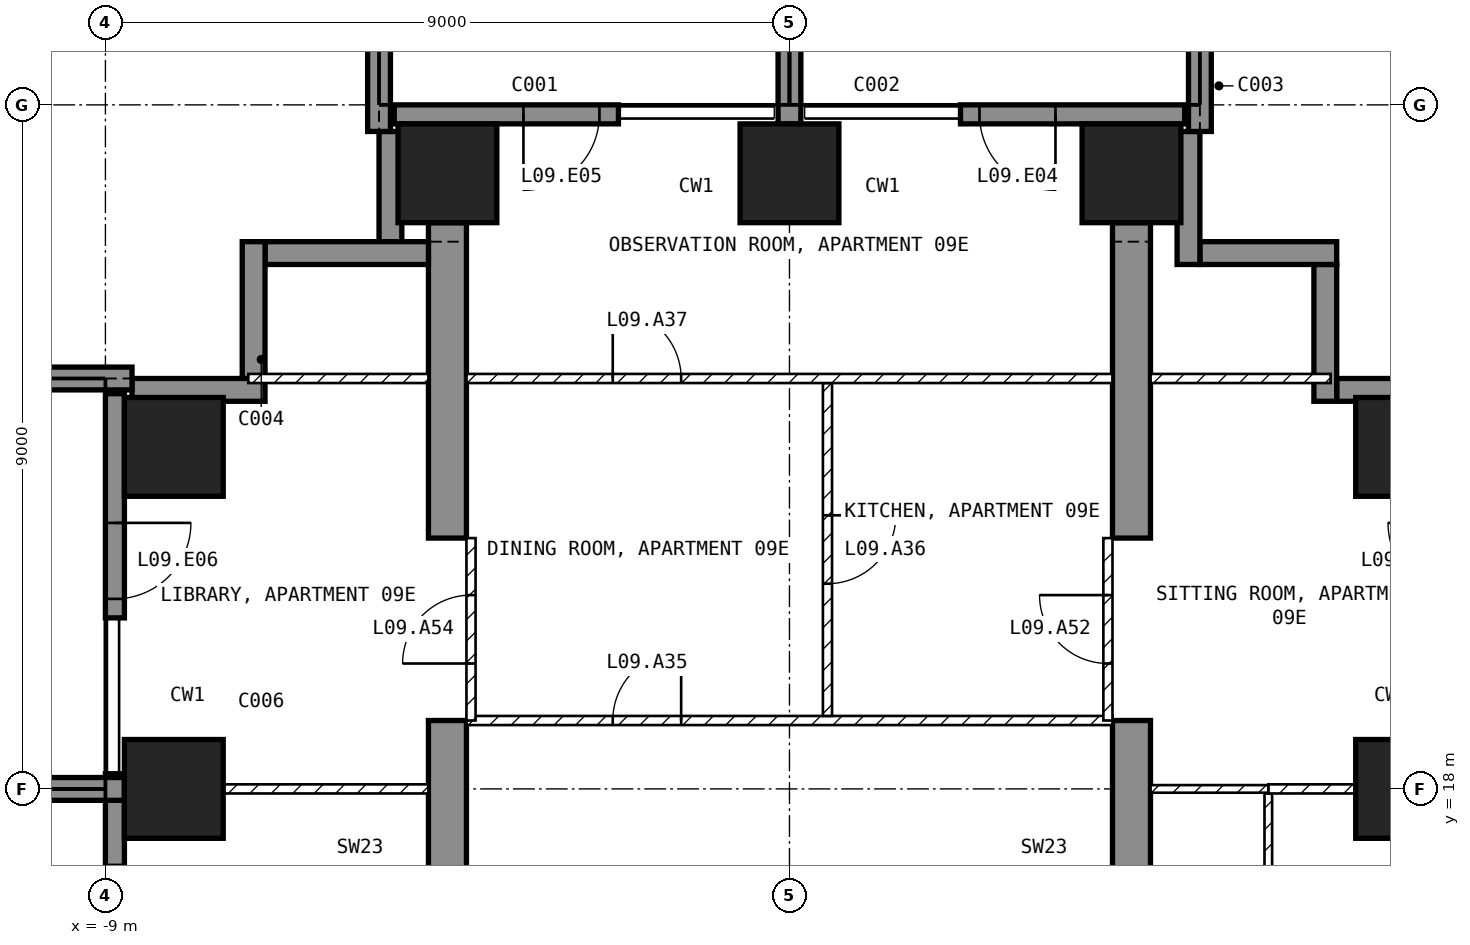
"""IFC4 building model, lengths in metres.
Left out: names, types, materials, properties, quantities, classifications, styles, units other than length and angle.
Written with IfcOpenShell. Run it as: python <this file> out.ifc"""

import sys

from ifc_helpers import new_model, si_unit, direction, frame, frame_2d, origin, origin_2d, place, context, subcontext, project, spatial, polyline, rectangle, outline, extrude, element, fill, save


model = new_model("IFC4")
c1 = context("Model", 3, precision=1e-05, world=origin(), true_north=direction((0.0, 1.0)))
c2 = subcontext(c1, "Body", "Model", "MODEL_VIEW")
j1 = project(units=[si_unit("LENGTHUNIT", "METRE"), si_unit("PLANEANGLEUNIT", "RADIAN")], contexts=[c1])
p1 = place(None, origin())
s1 = spatial("IfcSite", under=j1, at=p1, CompositionType="ELEMENT")
p2 = place(p1, origin())
s2 = spatial("IfcBuilding", under=s1, at=p2, CompositionType="ELEMENT")
p3 = place(p2, frame((0.0, 0.0, 50.5)))
s3 = spatial("IfcBuildingStorey", under=s2, at=p3, CompositionType="ELEMENT", Elevation=50.5)
for number, where, z_axis, x_axis in (
    (1, (-8.1, 18.0, -0.25), (0.0, 0.0, 1.0), (1.0, 0.0, 0.0)),
    (2, (-8.1, 22.5, -0.25), (0.0, 0.0, 1.0), (1.0, 0.0, 0.0)),
    (3, (-4.5, 26.1, -0.25), (0.0, 0.0, 1.0), (1.0, 0.0, 0.0)),
    (4, (0.0, 26.1, -0.25), (0.0, 0.0, 1.0), (1.0, 0.0, 0.0)),
    (5, (4.5, 26.1, -0.25), (0.0, 0.0, 1.0), (1.0, 0.0, 0.0)),
    (6, (8.1, 18.0, -0.25), (0.0, 0.0, 1.0), (1.0, 0.0, 0.0)),
    (7, (8.1, 22.5, -0.25), (0.0, 0.0, 1.0), (1.0, 0.0, 0.0)),
):
    element("IfcColumn", number, at=place(p3, frame(where, z_axis=z_axis, x_axis=x_axis)), inside=s3, PredefinedType="COLUMN", context=c2, shape_type="SweptSolid", body=[
        extrude(rectangle(XDim=1.3, YDim=1.3, at=origin_2d()), origin(), (0.0, 0.0, 1.0), 3.5),
    ])
for number, where, z_axis, x_axis in (
    (8, (-4.75, 9.0, -0.25), (1.0, 0.0, 0.0), (0.0, 1.0, 0.0)),
    (9, (4.25, 9.0, -0.25), (1.0, 0.0, 0.0), (0.0, 1.0, 0.0)),
):
    element("IfcWall", number, at=place(p3, frame(where, z_axis=z_axis, x_axis=x_axis)), inside=s3, PredefinedType="SHEAR", context=c2, shape_type="SweptSolid", body=[
        extrude(outline(polyline([(0.0, 0.0), (2.1, 0.0), (2.1, 2.65), (4.5, 2.65), (4.5, 0.0), (9.9, 0.0), (9.9, 2.65), (12.3, 2.65), (12.3, 0.0), (16.45, 0.0), (16.45, 3.5), (0.0, 3.5), (0.0, 0.0)])), origin(), (0.0, 0.0, 1.0), 0.5),
    ])
p4 = place(p3, frame((5.2, 26.875, 0.0), z_axis=(0.0, 0.0, 1.0), x_axis=(-1.0, 0.0, 0.0)))
e10 = element("IfcWall", 10, at=p4, inside=s3, PredefinedType="SOLIDWALL", context=c2, shape_type="SweptSolid", body=[
    extrude(rectangle(XDim=2.95, YDim=0.25, at=frame_2d((1.475, 0.0))), origin(), (0.0, 0.0, 1.0), 3.25),
])
p5 = place(p4, frame((1.7, 0.0, 0.0)))
e11 = element("IfcOpeningElement", 11, at=p5, cuts=e10, PredefinedType="OPENING", context=c2, shape_type="SweptSolid", body=[
    extrude(rectangle(XDim=1.0, YDim=2.4, at=frame_2d((0.5, 1.2))), frame((0.0, 0.135, 0.0), z_axis=(0.0, -1.0, 0.0), x_axis=(1.0, 0.0, 0.0)), (0.0, 0.0, 1.0), 0.27),
])
p6 = place(p3, frame((-2.25, 26.875, 0.0), z_axis=(0.0, 0.0, 1.0), x_axis=(-1.0, 0.0, 0.0)))
e12 = element("IfcWall", 12, at=p6, inside=s3, PredefinedType="SOLIDWALL", context=c2, shape_type="SweptSolid", body=[
    extrude(rectangle(XDim=2.95, YDim=0.25, at=frame_2d((1.475, 0.0))), origin(), (0.0, 0.0, 1.0), 3.25),
])
p7 = place(p6, frame((0.25, 0.0, 0.0)))
e13 = element("IfcOpeningElement", 13, at=p7, cuts=e12, PredefinedType="OPENING", context=c2, shape_type="SweptSolid", body=[
    extrude(rectangle(XDim=1.0, YDim=2.4, at=frame_2d((0.5, 1.2))), frame((0.0, 0.135, 0.0), z_axis=(0.0, -1.0, 0.0), x_axis=(1.0, 0.0, 0.0)), (0.0, 0.0, 1.0), 0.27),
])
p8 = place(p3, frame((-8.875, 23.2, 0.0), z_axis=(0.0, 0.0, 1.0), x_axis=(0.0, -1.0, 0.0)))
e14 = element("IfcWall", 14, at=p8, inside=s3, PredefinedType="SOLIDWALL", context=c2, shape_type="SweptSolid", body=[
    extrude(rectangle(XDim=2.95, YDim=0.25, at=frame_2d((1.475, 0.0))), origin(), (0.0, 0.0, 1.0), 3.25),
])
p9 = place(p8, frame((1.7, 0.0, 0.0)))
e15 = element("IfcOpeningElement", 15, at=p9, cuts=e14, PredefinedType="OPENING", context=c2, shape_type="SweptSolid", body=[
    extrude(rectangle(XDim=1.0, YDim=2.4, at=frame_2d((0.5, 1.2))), frame((0.0, 0.135, 0.0), z_axis=(0.0, -1.0, 0.0), x_axis=(1.0, 0.0, 0.0)), (0.0, 0.0, 1.0), 0.27),
])
p10 = place(p3, frame((-8.875, 18.2, 0.0), z_axis=(0.0, 0.0, 1.0), x_axis=(0.0, -1.0, 0.0)))
e16 = element("IfcWall", 16, at=p10, inside=s3, PredefinedType="SOLIDWALL", context=c2, shape_type="SweptSolid", body=[
    extrude(rectangle(XDim=2.65, YDim=0.25, at=frame_2d((1.325, 0.0))), origin(), (0.0, 0.0, 1.0), 3.25),
])
p11 = place(p10, frame((1.2, 0.0, 0.0)))
e17 = element("IfcOpeningElement", 17, at=p11, cuts=e16, PredefinedType="OPENING", context=c2, shape_type="SweptSolid", body=[
    extrude(rectangle(XDim=1.2, YDim=2.4, at=frame_2d((0.6, 1.2))), frame((0.0, 0.135, 0.0), z_axis=(0.0, -1.0, 0.0), x_axis=(1.0, 0.0, 0.0)), (0.0, 0.0, 1.0), 0.27),
])
p12 = place(p3, frame((8.65, 23.25, 0.0), z_axis=(0.0, 0.0, 1.0), x_axis=(-1.0, 0.0, 0.0)))
e18 = element("IfcWall", 18, at=p12, inside=s3, PredefinedType="SOLIDWALL", context=c2, shape_type="SweptSolid", body=[
    extrude(rectangle(XDim=1.45, YDim=0.3, at=frame_2d((0.725, 0.0))), origin(), (0.0, 0.0, 1.0), 3.25),
])
p13 = place(p3, frame((7.05, 23.1, 0.0), z_axis=(0.0, 0.0, 1.0), x_axis=(0.0, 1.0, 0.0)))
e19 = element("IfcWall", 19, at=p13, inside=s3, PredefinedType="SOLIDWALL", context=c2, shape_type="SweptSolid", body=[
    extrude(rectangle(XDim=1.8, YDim=0.3, at=frame_2d((0.9, 0.0))), origin(), (0.0, 0.0, 1.0), 3.25),
])
p14 = place(p3, frame((7.2, 25.05, 0.0), z_axis=(0.0, 0.0, 1.0), x_axis=(-1.0, 0.0, 0.0)))
e20 = element("IfcWall", 20, at=p14, inside=s3, PredefinedType="SOLIDWALL", context=c2, shape_type="SweptSolid", body=[
    extrude(rectangle(XDim=1.8, YDim=0.3, at=frame_2d((0.9, 0.0))), origin(), (0.0, 0.0, 1.0), 3.25),
])
p15 = place(p3, frame((5.25, 24.9, 0.0), z_axis=(0.0, 0.0, 1.0), x_axis=(0.0, 1.0, 0.0)))
e21 = element("IfcWall", 21, at=p15, inside=s3, PredefinedType="SOLIDWALL", context=c2, shape_type="SweptSolid", body=[
    extrude(rectangle(XDim=1.75, YDim=0.3, at=frame_2d((0.875, 0.0))), origin(), (0.0, 0.0, 1.0), 3.25),
])
p16 = place(p3, frame((-5.25, 26.65, 0.0), z_axis=(0.0, 0.0, 1.0), x_axis=(0.0, -1.0, 0.0)))
e22 = element("IfcWall", 22, at=p16, inside=s3, PredefinedType="SOLIDWALL", context=c2, shape_type="SweptSolid", body=[
    extrude(rectangle(XDim=1.45, YDim=0.3, at=frame_2d((0.725, 0.0))), origin(), (0.0, 0.0, 1.0), 3.25),
])
p17 = place(p3, frame((-4.75, 25.05, 0.0), z_axis=(0.0, 0.0, 1.0), x_axis=(-1.0, 0.0, 0.0)))
e23 = element("IfcWall", 23, at=p17, inside=s3, PredefinedType="SOLIDWALL", context=c2, shape_type="SweptSolid", body=[
    extrude(rectangle(XDim=2.15, YDim=0.3, at=frame_2d((1.075, 0.0))), origin(), (0.0, 0.0, 1.0), 3.25),
])
p18 = place(p3, frame((-7.05, 25.2, 0.0), z_axis=(0.0, 0.0, 1.0), x_axis=(0.0, -1.0, 0.0)))
e24 = element("IfcWall", 24, at=p18, inside=s3, PredefinedType="SOLIDWALL", context=c2, shape_type="SweptSolid", body=[
    extrude(rectangle(XDim=1.8, YDim=0.3, at=frame_2d((0.9, 0.0))), origin(), (0.0, 0.0, 1.0), 3.25),
])
p19 = place(p3, frame((-6.9, 23.25, 0.0), z_axis=(0.0, 0.0, 1.0), x_axis=(-1.0, 0.0, 0.0)))
e25 = element("IfcWall", 25, at=p19, inside=s3, PredefinedType="SOLIDWALL", context=c2, shape_type="SweptSolid", body=[
    extrude(rectangle(XDim=1.75, YDim=0.3, at=frame_2d((0.875, 0.0))), origin(), (0.0, 0.0, 1.0), 3.25),
])
p20 = place(p3, frame((-8.75, 18.0, 0.0), z_axis=(0.0, 0.0, 1.0), x_axis=(-1.0, 0.0, 0.0)))
e26 = element("IfcWall", 26, at=p20, inside=s3, PredefinedType="SOLIDWALL", context=c2, shape_type="SweptSolid", body=[
    extrude(rectangle(XDim=2.95, YDim=0.3, at=frame_2d((1.475, 0.0))), origin(), (0.0, 0.0, 1.0), 3.25),
])
for number, where, z_axis, x_axis in (
    (27, (-8.65, 23.4, 0.0), (0.0, 0.0, 1.0), (-1.0, 0.0, 0.0)),
    (28, (-5.4, 26.65, 0.0), (0.0, 0.0, 1.0), (0.0, 1.0, 0.0)),
):
    element("IfcWall", number, at=place(p3, frame(where, z_axis=z_axis, x_axis=x_axis)), inside=s3, PredefinedType="SOLIDWALL", context=c2, shape_type="SweptSolid", body=[
        extrude(rectangle(XDim=3.05, YDim=0.3, at=frame_2d((1.525, 0.0))), origin(), (0.0, 0.0, 1.0), 3.25),
    ])
p21 = place(p3, frame((0.0, 26.75, 0.0), z_axis=(0.0, 0.0, 1.0), x_axis=(0.0, 1.0, 0.0)))
e29 = element("IfcWall", 29, at=p21, inside=s3, PredefinedType="SOLIDWALL", context=c2, shape_type="SweptSolid", body=[
    extrude(rectangle(XDim=2.95, YDim=0.3, at=frame_2d((1.475, 0.0))), origin(), (0.0, 0.0, 1.0), 3.25),
])
p22 = place(p3, frame((5.4, 26.65, 0.0), z_axis=(0.0, 0.0, 1.0), x_axis=(0.0, 1.0, 0.0)))
e30 = element("IfcWall", 30, at=p22, inside=s3, PredefinedType="SOLIDWALL", context=c2, shape_type="SweptSolid", body=[
    extrude(rectangle(XDim=3.05, YDim=0.3, at=frame_2d((1.525, 0.0))), origin(), (0.0, 0.0, 1.0), 3.25),
])
p23 = place(p3, frame((-4.25, 18.9, 0.0), z_axis=(0.0, 0.0, 1.0), x_axis=(1.0, 0.0, 0.0)))
e31 = element("IfcWall", 31, at=p23, inside=s3, PredefinedType="PARTITIONING", context=c2, shape_type="SweptSolid", body=[
    extrude(rectangle(XDim=8.5, YDim=0.12, at=frame_2d((4.25, 0.0))), origin(), (0.0, 0.0, 1.0), 3.25),
])
p24 = place(p23, frame((1.925, 0.0, 0.0)))
e32 = element("IfcOpeningElement", 32, at=p24, cuts=e31, PredefinedType="OPENING", context=c2, shape_type="SweptSolid", body=[
    extrude(rectangle(XDim=0.9, YDim=2.1, at=frame_2d((0.45, 1.05))), frame((0.0, 0.07, 0.0), z_axis=(0.0, -1.0, 0.0), x_axis=(1.0, 0.0, 0.0)), (0.0, 0.0, 1.0), 0.14),
])
p25 = place(p3, frame((0.5, 23.34, 0.0), z_axis=(0.0, 0.0, 1.0), x_axis=(0.0, -1.0, 0.0)))
e33 = element("IfcWall", 33, at=p25, inside=s3, PredefinedType="PARTITIONING", context=c2, shape_type="SweptSolid", body=[
    extrude(rectangle(XDim=4.38, YDim=0.12, at=frame_2d((2.19, 0.0))), origin(), (0.0, 0.0, 1.0), 3.25),
])
p26 = place(p25, frame((1.74, 0.0, 0.0)))
e34 = element("IfcOpeningElement", 34, at=p26, cuts=e33, PredefinedType="OPENING", context=c2, shape_type="SweptSolid", body=[
    extrude(rectangle(XDim=0.9, YDim=2.1, at=frame_2d((0.45, 1.05))), frame((0.0, 0.07, 0.0), z_axis=(0.0, -1.0, 0.0), x_axis=(1.0, 0.0, 0.0)), (0.0, 0.0, 1.0), 0.14),
])
p27 = place(p3, frame((-4.25, 23.4, 0.0), z_axis=(0.0, 0.0, 1.0), x_axis=(1.0, 0.0, 0.0)))
e35 = element("IfcWall", 35, at=p27, inside=s3, PredefinedType="PARTITIONING", context=c2, shape_type="SweptSolid", body=[
    extrude(rectangle(XDim=8.5, YDim=0.12, at=frame_2d((4.25, 0.0))), origin(), (0.0, 0.0, 1.0), 3.25),
])
p28 = place(p27, frame((1.925, 0.0, 0.0)))
e36 = element("IfcOpeningElement", 36, at=p28, cuts=e35, PredefinedType="OPENING", context=c2, shape_type="SweptSolid", body=[
    extrude(rectangle(XDim=0.9, YDim=2.1, at=frame_2d((0.45, 1.05))), frame((0.0, 0.07, 0.0), z_axis=(0.0, -1.0, 0.0), x_axis=(1.0, 0.0, 0.0)), (0.0, 0.0, 1.0), 0.14),
])
p29 = place(p3, frame((6.3, 14.45, 0.0), z_axis=(0.0, 0.0, 1.0), x_axis=(0.0, 1.0, 0.0)))
e37 = element("IfcWall", 37, at=p29, inside=s3, PredefinedType="PARTITIONING", context=c2, shape_type="SweptSolid", body=[
    extrude(rectangle(XDim=3.49, YDim=0.1, at=frame_2d((1.745, 0.0))), origin(), (0.0, 0.0, 1.0), 3.25),
])
p30 = place(p3, frame((6.3, 18.0, 0.0), z_axis=(0.0, 0.0, 1.0), x_axis=(1.0, 0.0, 0.0)))
e38 = element("IfcWall", 38, at=p30, inside=s3, PredefinedType="PARTITIONING", context=c2, shape_type="SweptSolid", body=[
    extrude(rectangle(XDim=1.15, YDim=0.12, at=frame_2d((0.575, 0.0))), origin(), (0.0, 0.0, 1.0), 2.346),
])
p31 = place(p3, frame((4.75, 18.0, 0.0), z_axis=(0.0, 0.0, 1.0), x_axis=(1.0, 0.0, 0.0)))
e39 = element("IfcWall", 39, at=p31, inside=s3, PredefinedType="PARTITIONING", context=c2, shape_type="SweptSolid", body=[
    extrude(rectangle(XDim=1.55, YDim=0.1, at=frame_2d((0.775, 0.0))), origin(), (0.0, 0.0, 1.0), 2.346),
])
p32 = place(p3, frame((4.75, 23.4, 0.0), z_axis=(0.0, 0.0, 1.0), x_axis=(1.0, 0.0, 0.0)))
e40 = element("IfcWall", 40, at=p32, inside=s3, PredefinedType="PARTITIONING", context=c2, shape_type="SweptSolid", body=[
    extrude(rectangle(XDim=2.37, YDim=0.12, at=frame_2d((1.185, 0.0))), origin(), (0.0, 0.0, 1.0), 3.25),
])
p33 = place(p3, frame((-7.45, 18.0, 0.0), z_axis=(0.0, 0.0, 1.0), x_axis=(1.0, 0.0, 0.0)))
e41 = element("IfcWall", 41, at=p33, inside=s3, PredefinedType="PARTITIONING", context=c2, shape_type="SweptSolid", body=[
    extrude(rectangle(XDim=2.7, YDim=0.12, at=frame_2d((1.35, 0.0))), origin(), (0.0, 0.0, 1.0), 2.346),
])
p34 = place(p3, frame((-7.12, 23.4, 0.0), z_axis=(0.0, 0.0, 1.0), x_axis=(1.0, 0.0, 0.0)))
e42 = element("IfcWall", 42, at=p34, inside=s3, PredefinedType="PARTITIONING", context=c2, shape_type="SweptSolid", body=[
    extrude(rectangle(XDim=2.37, YDim=0.12, at=frame_2d((1.185, 0.0))), origin(), (0.0, 0.0, 1.0), 3.25),
])
p35 = place(p3, frame((4.19, 18.9, 0.0), z_axis=(0.0, 0.0, 1.0), x_axis=(0.0, 1.0, 0.0)))
e43 = element("IfcWall", 43, at=p35, inside=s3, PredefinedType="PARTITIONING", context=c2, shape_type="SweptSolid", body=[
    extrude(rectangle(XDim=2.4, YDim=0.12, at=frame_2d((1.2, 0.0))), origin(), (0.0, 0.0, 1.0), 2.4),
])
p36 = place(p35, frame((0.75, 0.0, 0.0)))
e44 = element("IfcOpeningElement", 44, at=p36, cuts=e43, PredefinedType="OPENING", context=c2, shape_type="SweptSolid", body=[
    extrude(rectangle(XDim=0.9, YDim=2.1, at=frame_2d((0.45, 1.05))), frame((0.0, 0.07, 0.0), z_axis=(0.0, -1.0, 0.0), x_axis=(1.0, 0.0, 0.0)), (0.0, 0.0, 1.0), 0.14),
])
p37 = place(p3, frame((-4.19, 18.9, 0.0), z_axis=(0.0, 0.0, 1.0), x_axis=(0.0, 1.0, 0.0)))
e45 = element("IfcWall", 45, at=p37, inside=s3, PredefinedType="PARTITIONING", context=c2, shape_type="SweptSolid", body=[
    extrude(rectangle(XDim=2.4, YDim=0.12, at=frame_2d((1.2, 0.0))), origin(), (0.0, 0.0, 1.0), 2.4),
])
p38 = place(p37, frame((0.75, 0.0, 0.0)))
e46 = element("IfcOpeningElement", 46, at=p38, cuts=e45, PredefinedType="OPENING", context=c2, shape_type="SweptSolid", body=[
    extrude(rectangle(XDim=0.9, YDim=2.1, at=frame_2d((0.45, 1.05))), frame((0.0, 0.07, 0.0), z_axis=(0.0, -1.0, 0.0), x_axis=(1.0, 0.0, 0.0)), (0.0, 0.0, 1.0), 0.14),
])
p39 = place(p5, origin())
e47 = element("IfcDoor", 47, at=p39, inside=s3, OperationType="SINGLE_SWING_LEFT", PredefinedType="DOOR", context=c2, shape_type="SweptSolid", body=[
    extrude(rectangle(XDim=1.0, YDim=2.4, at=frame_2d((0.5, 1.2))), frame((0.0, 0.025, 0.0), z_axis=(0.0, -1.0, 0.0), x_axis=(1.0, 0.0, 0.0)), (0.0, 0.0, 1.0), 0.05),
])
fill(e11, e47)
p40 = place(p7, origin())
e48 = element("IfcDoor", 48, at=p40, inside=s3, OperationType="SINGLE_SWING_RIGHT", PredefinedType="DOOR", context=c2, shape_type="SweptSolid", body=[
    extrude(rectangle(XDim=1.0, YDim=2.4, at=frame_2d((0.5, 1.2))), frame((0.0, 0.025, 0.0), z_axis=(0.0, -1.0, 0.0), x_axis=(1.0, 0.0, 0.0)), (0.0, 0.0, 1.0), 0.05),
])
fill(e13, e48)
p41 = place(p9, origin())
e49 = element("IfcDoor", 49, at=p41, inside=s3, OperationType="SINGLE_SWING_LEFT", PredefinedType="DOOR", context=c2, shape_type="SweptSolid", body=[
    extrude(rectangle(XDim=1.0, YDim=2.4, at=frame_2d((0.5, 1.2))), frame((0.0, 0.025, 0.0), z_axis=(0.0, -1.0, 0.0), x_axis=(1.0, 0.0, 0.0)), (0.0, 0.0, 1.0), 0.05),
])
fill(e15, e49)
p42 = place(p24, origin())
e50 = element("IfcDoor", 50, at=p42, inside=s3, OperationType="SINGLE_SWING_RIGHT", PredefinedType="DOOR", context=c2, shape_type="SweptSolid", body=[
    extrude(rectangle(XDim=0.9, YDim=2.1, at=frame_2d((0.45, 1.05))), frame((0.0, 0.025, 0.0), z_axis=(0.0, -1.0, 0.0), x_axis=(1.0, 0.0, 0.0)), (0.0, 0.0, 1.0), 0.05),
])
fill(e32, e50)
p43 = place(p26, origin())
e51 = element("IfcDoor", 51, at=p43, inside=s3, OperationType="SINGLE_SWING_LEFT", PredefinedType="DOOR", context=c2, shape_type="SweptSolid", body=[
    extrude(rectangle(XDim=0.9, YDim=2.1, at=frame_2d((0.45, 1.05))), frame((0.0, 0.025, 0.0), z_axis=(0.0, -1.0, 0.0), x_axis=(1.0, 0.0, 0.0)), (0.0, 0.0, 1.0), 0.05),
])
fill(e34, e51)
p44 = place(p28, origin())
e52 = element("IfcDoor", 52, at=p44, inside=s3, OperationType="SINGLE_SWING_LEFT", PredefinedType="DOOR", context=c2, shape_type="SweptSolid", body=[
    extrude(rectangle(XDim=0.9, YDim=2.1, at=frame_2d((0.45, 1.05))), frame((0.0, 0.025, 0.0), z_axis=(0.0, -1.0, 0.0), x_axis=(1.0, 0.0, 0.0)), (0.0, 0.0, 1.0), 0.05),
])
fill(e36, e52)
p45 = place(p36, origin())
e53 = element("IfcDoor", 53, at=p45, inside=s3, OperationType="SINGLE_SWING_RIGHT", PredefinedType="DOOR", context=c2, shape_type="SweptSolid", body=[
    extrude(rectangle(XDim=0.9, YDim=2.1, at=frame_2d((0.45, 1.05))), frame((0.0, 0.025, 0.0), z_axis=(0.0, -1.0, 0.0), x_axis=(1.0, 0.0, 0.0)), (0.0, 0.0, 1.0), 0.05),
])
fill(e44, e53)
p46 = place(p38, origin())
e54 = element("IfcDoor", 54, at=p46, inside=s3, OperationType="SINGLE_SWING_LEFT", PredefinedType="DOOR", context=c2, shape_type="SweptSolid", body=[
    extrude(rectangle(XDim=0.9, YDim=2.1, at=frame_2d((0.45, 1.05))), frame((0.0, 0.025, 0.0), z_axis=(0.0, -1.0, 0.0), x_axis=(1.0, 0.0, 0.0)), (0.0, 0.0, 1.0), 0.05),
])
fill(e46, e54)
save(model, sys.argv[1])
